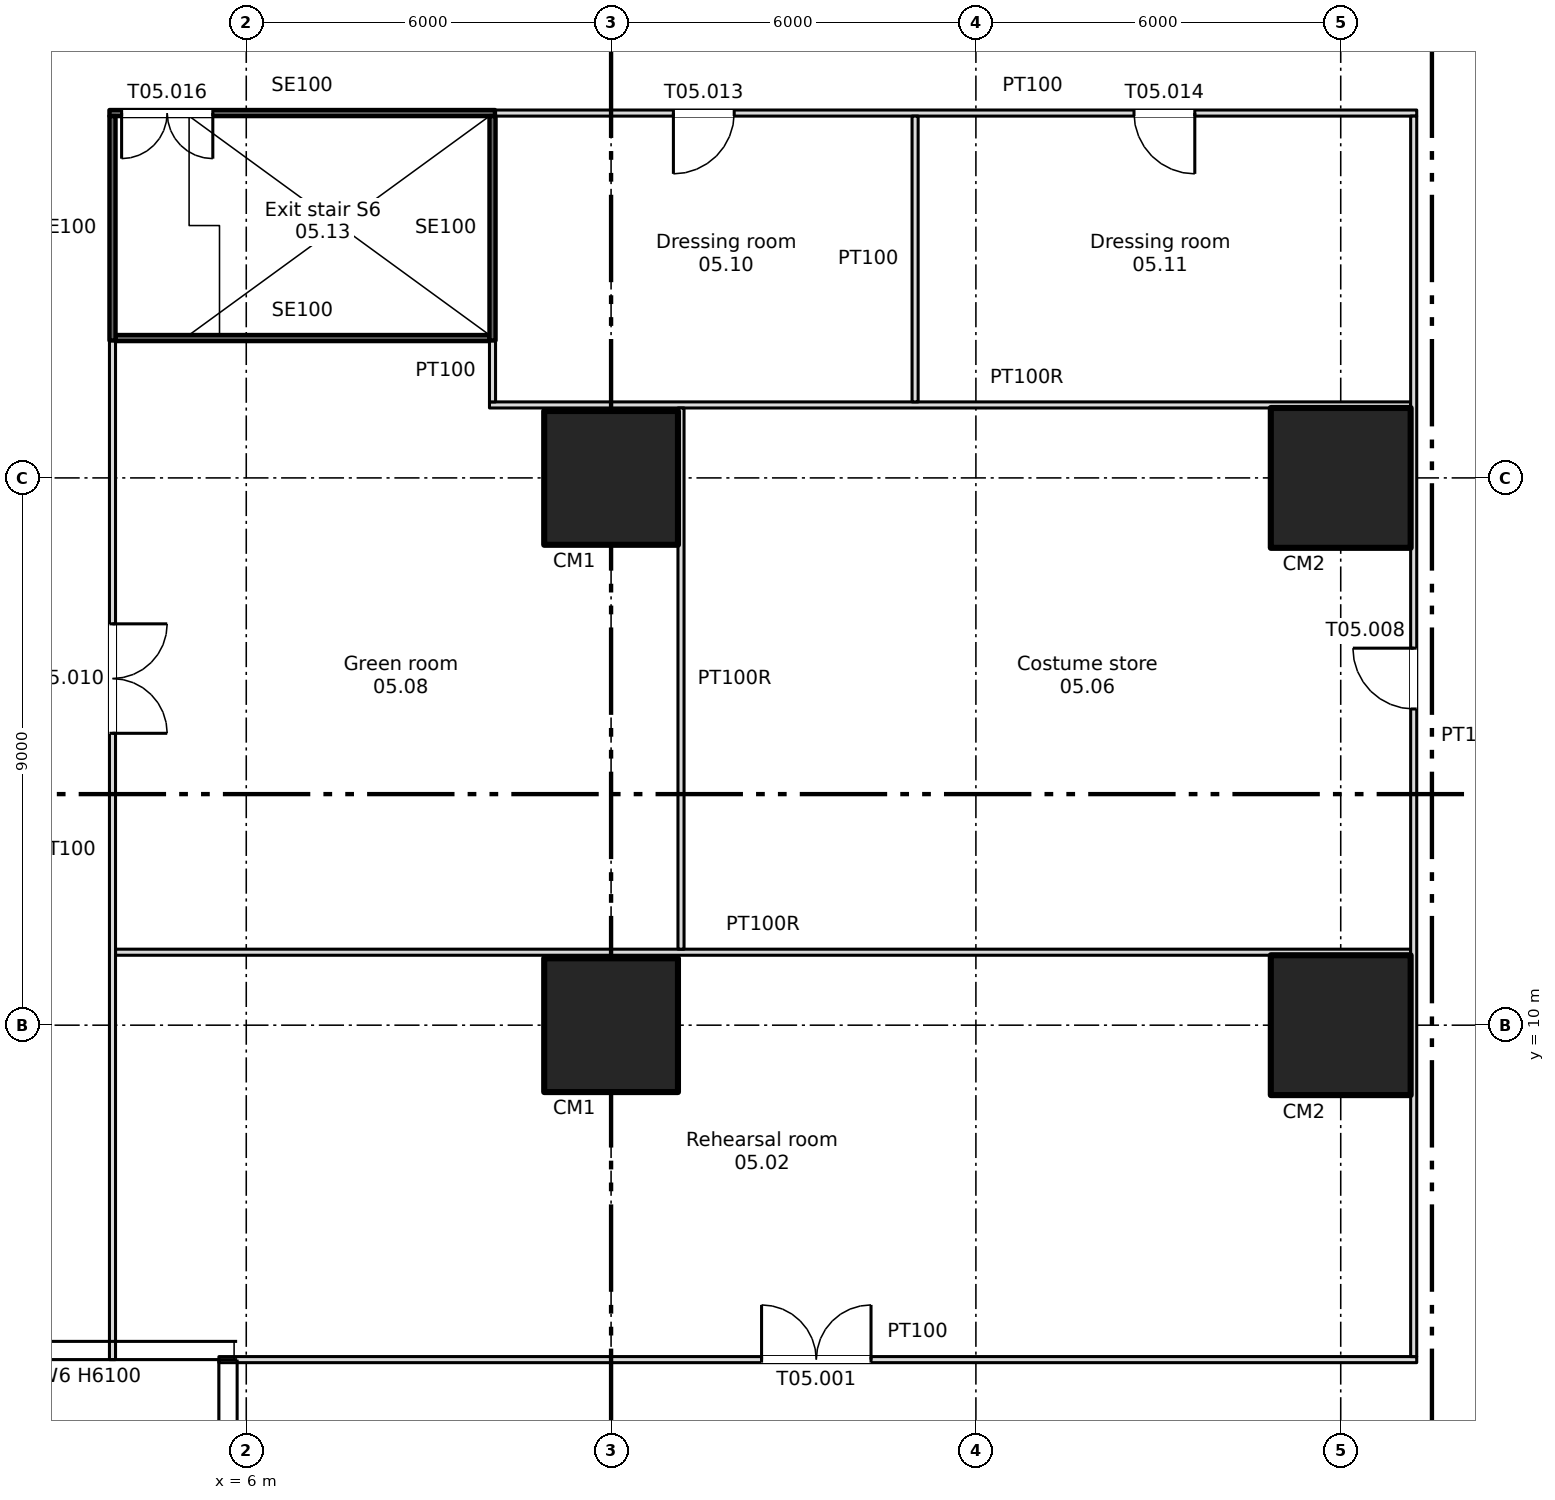
"""IFC4 building model, lengths in metres.
Left out: names, types, materials, properties, quantities, classifications, styles, units other than length and angle.
Written with IfcOpenShell. Run it as: python <this file> out.ifc"""

import sys

from ifc_helpers import new_model, si_unit, direction, frame, frame_2d, origin, origin_2d, place, context, subcontext, project, spatial, rectangle, extrude, element, fill, save


model = new_model("IFC4")
c1 = context("Model", 3, precision=1e-05, world=origin(), true_north=direction((0.0, 1.0)))
c2 = subcontext(c1, "Body", "Model", "MODEL_VIEW")
j1 = project(units=[si_unit("LENGTHUNIT", "METRE"), si_unit("PLANEANGLEUNIT", "RADIAN")], contexts=[c1])
p1 = place(None, origin())
s1 = spatial("IfcSite", under=j1, at=p1, CompositionType="ELEMENT")
p2 = place(p1, origin())
s2 = spatial("IfcBuilding", under=s1, at=p2, CompositionType="ELEMENT")
p3 = place(p2, frame((0.0, 0.0, 11.3)))
s3 = spatial("IfcBuildingStorey", under=s2, at=p3, CompositionType="ELEMENT", Elevation=11.3)
for number, where, z_axis, x_axis in (
    (1, (12.0, 10.0, 0.0), (0.0, 0.0, 1.0), (1.0, 0.0, 0.0)),
    (2, (12.0, 19.0, 0.0), (0.0, 0.0, 1.0), (1.0, 0.0, 0.0)),
):
    element("IfcColumn", number, at=place(p3, frame(where, z_axis=z_axis, x_axis=x_axis)), inside=s3, PredefinedType="COLUMN", context=c2, shape_type="SweptSolid", body=[
        extrude(rectangle(XDim=2.2, YDim=2.2, at=origin_2d()), origin(), (0.0, 0.0, 1.0), 6.1),
    ])
for number, where, z_axis, x_axis in (
    (3, (24.0, 10.0, 0.0), (0.0, 0.0, 1.0), (1.0, 0.0, 0.0)),
    (4, (24.0, 19.0, 0.0), (0.0, 0.0, 1.0), (1.0, 0.0, 0.0)),
):
    element("IfcColumn", number, at=place(p3, frame(where, z_axis=z_axis, x_axis=x_axis)), inside=s3, PredefinedType="COLUMN", context=c2, shape_type="SweptSolid", body=[
        extrude(rectangle(XDim=2.3, YDim=2.3, at=origin_2d()), origin(), (0.0, 0.0, 1.0), 6.1),
    ])
p4 = place(p3, frame((5.55, 4.5, 0.0), z_axis=(0.0, 0.0, 1.0), x_axis=(1.0, 0.0, 0.0)))
e5 = element("IfcWall", 5, at=p4, inside=s3, PredefinedType="PARTITIONING", context=c2, shape_type="SweptSolid", body=[
    extrude(rectangle(XDim=19.7, YDim=0.1, at=frame_2d((9.85, 0.0))), origin(), (0.0, 0.0, 1.0), 6.1),
])
p5 = place(p4, frame((8.925, 0.0, 0.0)))
e6 = element("IfcOpeningElement", 6, at=p5, cuts=e5, PredefinedType="OPENING", context=c2, shape_type="SweptSolid", body=[
    extrude(rectangle(XDim=1.8, YDim=2.1, at=frame_2d((0.9, 1.05))), frame((0.0, 0.06, 0.0), z_axis=(0.0, -1.0, 0.0), x_axis=(1.0, 0.0, 0.0)), (0.0, 0.0, 1.0), 0.12),
])
p6 = place(p3, frame((3.85, 11.2, 0.0), z_axis=(0.0, 0.0, 1.0), x_axis=(1.0, 0.0, 0.0)))
e7 = element("IfcWall", 7, at=p6, inside=s3, PredefinedType="PARTITIONING", context=c2, shape_type="SweptSolid", body=[
    extrude(rectangle(XDim=21.3, YDim=0.1, at=frame_2d((10.65, 0.0))), origin(), (0.0, 0.0, 1.0), 6.1),
])
p7 = place(p3, frame((10.0, 20.2, 0.0), z_axis=(0.0, 0.0, 1.0), x_axis=(1.0, 0.0, 0.0)))
e8 = element("IfcWall", 8, at=p7, inside=s3, PredefinedType="PARTITIONING", context=c2, shape_type="SweptSolid", body=[
    extrude(rectangle(XDim=15.15, YDim=0.1, at=frame_2d((7.575, 0.0))), origin(), (0.0, 0.0, 1.0), 6.1),
])
p8 = place(p3, frame((3.85, 21.3, 0.0), z_axis=(0.0, 0.0, 1.0), x_axis=(1.0, 0.0, 0.0)))
e9 = element("IfcWall", 9, at=p8, inside=s3, PredefinedType="SOLIDWALL", context=c2, shape_type="SweptSolid", body=[
    extrude(rectangle(XDim=6.15, YDim=0.1, at=frame_2d((3.075, 0.0))), origin(), (0.0, 0.0, 1.0), 6.1),
])
p9 = place(p3, frame((3.75, 25.0, 0.0), z_axis=(0.0, 0.0, 1.0), x_axis=(1.0, 0.0, 0.0)))
e10 = element("IfcWall", 10, at=p9, inside=s3, PredefinedType="SOLIDWALL", context=c2, shape_type="SweptSolid", body=[
    extrude(rectangle(XDim=6.34, YDim=0.1, at=frame_2d((3.17, 0.0))), origin(), (0.0, 0.0, 1.0), 6.1),
])
p10 = place(p9, frame((0.2, 0.0, 0.0)))
e11 = element("IfcOpeningElement", 11, at=p10, cuts=e10, PredefinedType="OPENING", context=c2, shape_type="SweptSolid", body=[
    extrude(rectangle(XDim=1.5, YDim=2.1, at=frame_2d((0.75, 1.05))), frame((0.0, 0.06, 0.0), z_axis=(0.0, -1.0, 0.0), x_axis=(1.0, 0.0, 0.0)), (0.0, 0.0, 1.0), 0.12),
])
p11 = place(p3, frame((10.09, 25.0, 0.0), z_axis=(0.0, 0.0, 1.0), x_axis=(1.0, 0.0, 0.0)))
e12 = element("IfcWall", 12, at=p11, inside=s3, PredefinedType="PARTITIONING", context=c2, shape_type="SweptSolid", body=[
    extrude(rectangle(XDim=15.16, YDim=0.1, at=frame_2d((7.58, 0.0))), origin(), (0.0, 0.0, 1.0), 6.1),
])
p12 = place(p11, frame((2.935, 0.0, 0.0)))
e13 = element("IfcOpeningElement", 13, at=p12, cuts=e12, PredefinedType="OPENING", context=c2, shape_type="SweptSolid", body=[
    extrude(rectangle(XDim=1.0, YDim=2.1, at=frame_2d((0.5, 1.05))), frame((0.0, 0.06, 0.0), z_axis=(0.0, -1.0, 0.0), x_axis=(1.0, 0.0, 0.0)), (0.0, 0.0, 1.0), 0.12),
])
p13 = place(p11, frame((10.51, 0.0, 0.0)))
e14 = element("IfcOpeningElement", 14, at=p13, cuts=e12, PredefinedType="OPENING", context=c2, shape_type="SweptSolid", body=[
    extrude(rectangle(XDim=1.0, YDim=2.1, at=frame_2d((0.5, 1.05))), frame((0.0, 0.06, 0.0), z_axis=(0.0, -1.0, 0.0), x_axis=(1.0, 0.0, 0.0)), (0.0, 0.0, 1.0), 0.12),
])
p14 = place(p3, frame((3.8, 4.5, 0.0), z_axis=(0.0, 0.0, 1.0), x_axis=(0.0, 1.0, 0.0)))
e15 = element("IfcWall", 15, at=p14, inside=s3, PredefinedType="PARTITIONING", context=c2, shape_type="SweptSolid", body=[
    extrude(rectangle(XDim=16.76, YDim=0.1, at=frame_2d((8.38, 0.0))), origin(), (0.0, 0.0, 1.0), 6.1),
])
p15 = place(p14, frame((10.3, 0.0, 0.0)))
e16 = element("IfcOpeningElement", 16, at=p15, cuts=e15, PredefinedType="OPENING", context=c2, shape_type="SweptSolid", body=[
    extrude(rectangle(XDim=1.8, YDim=2.1, at=frame_2d((0.9, 1.05))), frame((0.0, 0.06, 0.0), z_axis=(0.0, -1.0, 0.0), x_axis=(1.0, 0.0, 0.0)), (0.0, 0.0, 1.0), 0.12),
])
p16 = place(p3, frame((3.8, 21.26, 0.0), z_axis=(0.0, 0.0, 1.0), x_axis=(0.0, 1.0, 0.0)))
e17 = element("IfcWall", 17, at=p16, inside=s3, PredefinedType="SOLIDWALL", context=c2, shape_type="SweptSolid", body=[
    extrude(rectangle(XDim=3.69, YDim=0.1, at=frame_2d((1.845, 0.0))), origin(), (0.0, 0.0, 1.0), 6.1),
])
p17 = place(p3, frame((10.05, 20.25, 0.0), z_axis=(0.0, 0.0, 1.0), x_axis=(0.0, 1.0, 0.0)))
e18 = element("IfcWall", 18, at=p17, inside=s3, PredefinedType="PARTITIONING", context=c2, shape_type="SweptSolid", body=[
    extrude(rectangle(XDim=1.01, YDim=0.1, at=frame_2d((0.505, 0.0))), origin(), (0.0, 0.0, 1.0), 6.1),
])
p18 = place(p3, frame((10.05, 21.26, 0.0), z_axis=(0.0, 0.0, 1.0), x_axis=(0.0, 1.0, 0.0)))
e19 = element("IfcWall", 19, at=p18, inside=s3, PredefinedType="SOLIDWALL", context=c2, shape_type="SweptSolid", body=[
    extrude(rectangle(XDim=3.69, YDim=0.1, at=frame_2d((1.845, 0.0))), origin(), (0.0, 0.0, 1.0), 6.1),
])
p19 = place(p3, frame((13.15, 11.25, 0.0), z_axis=(0.0, 0.0, 1.0), x_axis=(0.0, 1.0, 0.0)))
e20 = element("IfcWall", 20, at=p19, inside=s3, PredefinedType="PARTITIONING", context=c2, shape_type="SweptSolid", body=[
    extrude(rectangle(XDim=8.9, YDim=0.1, at=frame_2d((4.45, 0.0))), origin(), (0.0, 0.0, 1.0), 6.1),
])
p20 = place(p3, frame((17.0, 20.25, 0.0), z_axis=(0.0, 0.0, 1.0), x_axis=(0.0, 1.0, 0.0)))
e21 = element("IfcWall", 21, at=p20, inside=s3, PredefinedType="PARTITIONING", context=c2, shape_type="SweptSolid", body=[
    extrude(rectangle(XDim=4.7, YDim=0.1, at=frame_2d((2.35, 0.0))), origin(), (0.0, 0.0, 1.0), 6.1),
])
p21 = place(p3, frame((25.2, 4.55, 0.0), z_axis=(0.0, 0.0, 1.0), x_axis=(0.0, 1.0, 0.0)))
e22 = element("IfcWall", 22, at=p21, inside=s3, PredefinedType="PARTITIONING", context=c2, shape_type="SweptSolid", body=[
    extrude(rectangle(XDim=20.4, YDim=0.1, at=frame_2d((10.2, 0.0))), origin(), (0.0, 0.0, 1.0), 6.1),
])
p22 = place(p21, frame((10.65, 0.0, 0.0)))
e23 = element("IfcOpeningElement", 23, at=p22, cuts=e22, PredefinedType="OPENING", context=c2, shape_type="SweptSolid", body=[
    extrude(rectangle(XDim=1.0, YDim=2.1, at=frame_2d((0.5, 1.05))), frame((0.0, 0.06, 0.0), z_axis=(0.0, -1.0, 0.0), x_axis=(1.0, 0.0, 0.0)), (0.0, 0.0, 1.0), 0.12),
])
p23 = place(p5, origin())
e24 = element("IfcDoor", 24, at=p23, inside=s3, OperationType="DOUBLE_DOOR_SINGLE_SWING", PredefinedType="DOOR", context=c2, shape_type="SweptSolid", body=[
    extrude(rectangle(XDim=1.8, YDim=2.1, at=frame_2d((0.9, 1.05))), frame((0.0, 0.025, 0.0), z_axis=(0.0, -1.0, 0.0), x_axis=(1.0, 0.0, 0.0)), (0.0, 0.0, 1.0), 0.05),
])
fill(e6, e24)
p24 = place(p22, origin())
e25 = element("IfcDoor", 25, at=p24, inside=s3, OperationType="SINGLE_SWING_RIGHT", PredefinedType="DOOR", context=c2, shape_type="SweptSolid", body=[
    extrude(rectangle(XDim=1.0, YDim=2.1, at=frame_2d((0.5, 1.05))), frame((0.0, 0.025, 0.0), z_axis=(0.0, -1.0, 0.0), x_axis=(1.0, 0.0, 0.0)), (0.0, 0.0, 1.0), 0.05),
])
fill(e23, e25)
p25 = place(p15, origin())
e26 = element("IfcDoor", 26, at=p25, inside=s3, OperationType="DOUBLE_DOOR_SINGLE_SWING", PredefinedType="DOOR", context=c2, shape_type="SweptSolid", body=[
    extrude(rectangle(XDim=1.8, YDim=2.1, at=frame_2d((0.9, 1.05))), frame((0.0, 0.025, 0.0), z_axis=(0.0, -1.0, 0.0), x_axis=(1.0, 0.0, 0.0)), (0.0, 0.0, 1.0), 0.05),
])
fill(e16, e26)
p26 = place(p12, origin())
e27 = element("IfcDoor", 27, at=p26, inside=s3, OperationType="SINGLE_SWING_LEFT", PredefinedType="DOOR", context=c2, shape_type="SweptSolid", body=[
    extrude(rectangle(XDim=1.0, YDim=2.1, at=frame_2d((0.5, 1.05))), frame((0.0, 0.025, 0.0), z_axis=(0.0, -1.0, 0.0), x_axis=(1.0, 0.0, 0.0)), (0.0, 0.0, 1.0), 0.05),
])
fill(e13, e27)
p27 = place(p13, origin())
e28 = element("IfcDoor", 28, at=p27, inside=s3, OperationType="SINGLE_SWING_RIGHT", PredefinedType="DOOR", context=c2, shape_type="SweptSolid", body=[
    extrude(rectangle(XDim=1.0, YDim=2.1, at=frame_2d((0.5, 1.05))), frame((0.0, 0.025, 0.0), z_axis=(0.0, -1.0, 0.0), x_axis=(1.0, 0.0, 0.0)), (0.0, 0.0, 1.0), 0.05),
])
fill(e14, e28)
p28 = place(p10, origin())
e29 = element("IfcDoor", 29, at=p28, inside=s3, OperationType="DOUBLE_DOOR_SINGLE_SWING", PredefinedType="DOOR", context=c2, shape_type="SweptSolid", body=[
    extrude(rectangle(XDim=1.5, YDim=2.1, at=frame_2d((0.75, 1.05))), frame((0.0, 0.025, 0.0), z_axis=(0.0, -1.0, 0.0), x_axis=(1.0, 0.0, 0.0)), (0.0, 0.0, 1.0), 0.05),
])
fill(e11, e29)
save(model, sys.argv[1])
